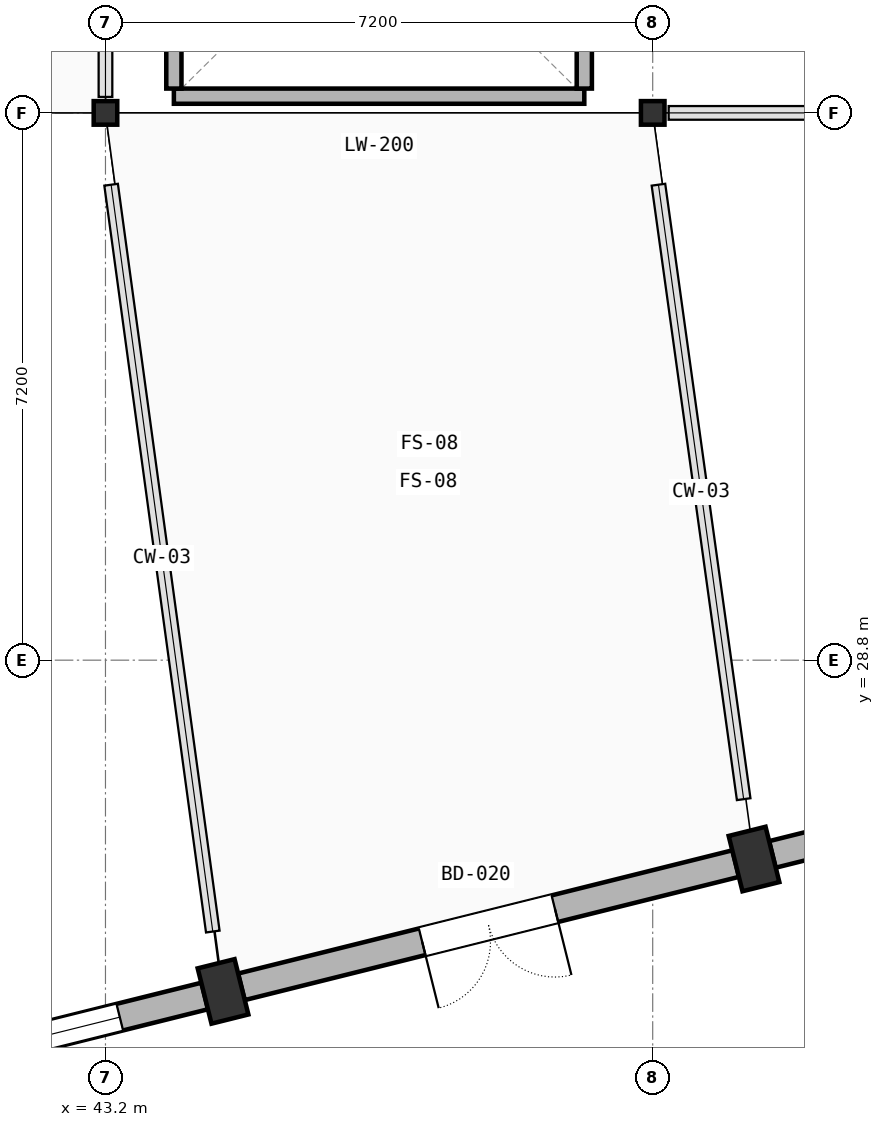
"""IFC4 building model, lengths in metres.
Left out: names, types, materials, properties, quantities, classifications, styles, units other than length and angle.
Written with IfcOpenShell. Run it as: python <this file> out.ifc"""

import sys

from ifc_helpers import new_model, si_unit, direction, frame, frame_2d, origin, origin_2d, place, context, subcontext, project, spatial, rectangle, hollow_rectangle, extrude, element, fill, save


model = new_model("IFC4")
c1 = context("Model", 3, precision=1e-05, world=origin(), true_north=direction((0.0, 1.0)))
c2 = subcontext(c1, "Body", "Model", "MODEL_VIEW")
j1 = project(units=[si_unit("LENGTHUNIT", "METRE"), si_unit("PLANEANGLEUNIT", "RADIAN")], contexts=[c1])
p1 = place(None, origin())
s1 = spatial("IfcSite", under=j1, at=p1, CompositionType="ELEMENT")
p2 = place(p1, origin())
s2 = spatial("IfcBuilding", under=s1, at=p2, CompositionType="ELEMENT")
p3 = place(p2, frame((0.0, 0.0, 14.4)))
s3 = spatial("IfcBuildingStorey", under=s2, at=p3, CompositionType="ELEMENT", Elevation=14.4)
for number, where, z_axis, x_axis in (
    (1, (44.747, 24.442, 0.0), (0.0, 0.0, 1.0), (0.97, 0.242, 0.0)),
    (2, (51.733, 26.184, 0.0), (0.0, 0.0, 1.0), (0.97, 0.242, 0.0)),
):
    element("IfcColumn", number, at=place(p3, frame(where, z_axis=z_axis, x_axis=x_axis)), inside=s3, PredefinedType="COLUMN", context=c2, shape_type="SweptSolid", body=[
        extrude(rectangle(XDim=0.5, YDim=0.75, at=origin_2d()), origin(), (0.0, 0.0, 1.0), 4.2),
    ])
for number, where, z_axis, x_axis in (
    (3, (43.2, 36.0, 0.0), (0.0, 0.0, 1.0), (1.0, 0.0, 0.0)),
    (4, (50.4, 36.0, 0.0), (0.0, 0.0, 1.0), (1.0, 0.0, 0.0)),
):
    element("IfcColumn", number, at=place(p3, frame(where, z_axis=z_axis, x_axis=x_axis)), inside=s3, PredefinedType="COLUMN", context=c2, shape_type="SweptSolid", body=[
        extrude(hollow_rectangle(XDim=0.31, YDim=0.31, WallThickness=0.012, InnerFilletRadius=0.012, OuterFilletRadius=0.024, at=origin_2d()), origin(), (0.0, 0.0, 1.0), 4.2),
    ])
p4 = place(p3, frame((49.5, 36.22, 0.0), z_axis=(0.0, 0.0, 1.0), x_axis=(-1.0, 0.0, 0.0)))
e5 = element("IfcWall", 5, at=p4, inside=s3, PredefinedType="PARTITIONING", context=c2, shape_type="SweptSolid", body=[
    extrude(rectangle(XDim=5.4, YDim=0.2, at=frame_2d((2.7, 0.0))), origin(), (0.0, 0.0, 1.0), 3.48),
])
for number, where, z_axis, x_axis in (
    (6, (44.1, 42.88, 0.0), (0.0, 0.0, 1.0), (0.0, -1.0, 0.0)),
    (7, (49.5, 36.32, 0.0), (0.0, 0.0, 1.0), (0.0, 1.0, 0.0)),
):
    element("IfcWall", number, at=place(p3, frame(where, z_axis=z_axis, x_axis=x_axis)), inside=s3, PredefinedType="PARTITIONING", context=c2, shape_type="SweptSolid", body=[
        extrude(rectangle(XDim=6.56, YDim=0.2, at=frame_2d((3.28, 0.0))), origin(), (0.0, 0.0, 1.0), 3.48),
    ])
p5 = place(p3, frame((44.506, 24.382, 0.0), z_axis=(0.0, 0.0, 1.0), x_axis=(-0.970296540998, -0.241918627903, 0.0)))
e8 = element("IfcWall", 8, at=p5, inside=s3, PredefinedType="SOLIDWALL", context=c2, shape_type="SweptSolid", body=[
    extrude(rectangle(XDim=6.704, YDim=0.36, at=frame_2d((3.352, 0.0))), origin(), (0.0, 0.0, 1.0), 3.04),
])
p6 = place(p5, frame((1.152, 0.0, 0.65)))
e9 = element("IfcOpeningElement", 9, at=p6, cuts=e8, PredefinedType="OPENING", context=c2, shape_type="SweptSolid", body=[
    extrude(rectangle(XDim=1.35, YDim=2.15, at=frame_2d((0.675, 1.075))), frame((0.0, 0.19, 0.0), z_axis=(0.0, -1.0, 0.0), x_axis=(1.0, 0.0, 0.0)), (0.0, 0.0, 1.0), 0.38),
])
p7 = place(p5, frame((4.252, 0.0, 0.65)))
e10 = element("IfcOpeningElement", 10, at=p7, cuts=e8, PredefinedType="OPENING", context=c2, shape_type="SweptSolid", body=[
    extrude(rectangle(XDim=1.35, YDim=2.15, at=frame_2d((0.675, 1.075))), frame((0.0, 0.19, 0.0), z_axis=(0.0, -1.0, 0.0), x_axis=(1.0, 0.0, 0.0)), (0.0, 0.0, 1.0), 0.38),
])
p8 = place(p3, frame((51.492, 26.124, 0.0), z_axis=(0.0, 0.0, 1.0), x_axis=(-0.970287992186, -0.241952913229, 0.0)))
e11 = element("IfcWall", 11, at=p8, inside=s3, PredefinedType="SOLIDWALL", context=c2, shape_type="SweptSolid", body=[
    extrude(rectangle(XDim=6.704, YDim=0.36, at=frame_2d((3.352, 0.0))), origin(), (0.0, 0.0, 1.0), 3.04),
])
p9 = place(p8, frame((2.452, 0.0, 0.0)))
e12 = element("IfcOpeningElement", 12, at=p9, cuts=e11, PredefinedType="OPENING", context=c2, shape_type="SweptSolid", body=[
    extrude(rectangle(XDim=1.8, YDim=2.2, at=frame_2d((0.9, 1.1))), frame((0.0, 0.19, 0.0), z_axis=(0.0, -1.0, 0.0), x_axis=(1.0, 0.0, 0.0)), (0.0, 0.0, 1.0), 0.38),
])
p10 = place(p3, frame((58.478, 27.866, 0.0), z_axis=(0.0, 0.0, 1.0), x_axis=(-0.970296540998, -0.241918627903, 0.0)))
e13 = element("IfcWall", 13, at=p10, inside=s3, PredefinedType="SOLIDWALL", context=c2, shape_type="SweptSolid", body=[
    extrude(rectangle(XDim=6.704, YDim=0.36, at=frame_2d((3.352, 0.0))), origin(), (0.0, 0.0, 1.0), 3.04),
])
p11 = place(p10, frame((1.152, 0.0, 0.65)))
e14 = element("IfcOpeningElement", 14, at=p11, cuts=e13, PredefinedType="OPENING", context=c2, shape_type="SweptSolid", body=[
    extrude(rectangle(XDim=1.35, YDim=2.15, at=frame_2d((0.675, 1.075))), frame((0.0, 0.19, 0.0), z_axis=(0.0, -1.0, 0.0), x_axis=(1.0, 0.0, 0.0)), (0.0, 0.0, 1.0), 0.38),
])
p12 = place(p10, frame((4.252, 0.0, 0.65)))
e15 = element("IfcOpeningElement", 15, at=p12, cuts=e13, PredefinedType="OPENING", context=c2, shape_type="SweptSolid", body=[
    extrude(rectangle(XDim=1.35, YDim=2.15, at=frame_2d((0.675, 1.075))), frame((0.0, 0.19, 0.0), z_axis=(0.0, -1.0, 0.0), x_axis=(1.0, 0.0, 0.0)), (0.0, 0.0, 1.0), 0.38),
])
p13 = place(p6, origin())
e16 = element("IfcWindow", 16, at=p13, inside=s3, PartitioningType="DOUBLE_PANEL_VERTICAL", PredefinedType="WINDOW", context=c2, shape_type="SweptSolid", body=[
    extrude(rectangle(XDim=1.35, YDim=2.15, at=frame_2d((0.675, 1.075))), frame((0.0, 0.03, 0.0), z_axis=(0.0, -1.0, 0.0), x_axis=(1.0, 0.0, 0.0)), (0.0, 0.0, 1.0), 0.06),
])
fill(e9, e16)
p14 = place(p9, origin())
e17 = element("IfcDoor", 17, at=p14, inside=s3, OperationType="DOUBLE_DOOR_SINGLE_SWING", PredefinedType="DOOR", context=c2, shape_type="SweptSolid", body=[
    extrude(rectangle(XDim=1.8, YDim=2.2, at=frame_2d((0.9, 1.1))), frame((0.0, 0.025, 0.0), z_axis=(0.0, -1.0, 0.0), x_axis=(1.0, 0.0, 0.0)), (0.0, 0.0, 1.0), 0.05),
])
fill(e12, e17)
save(model, sys.argv[1])
